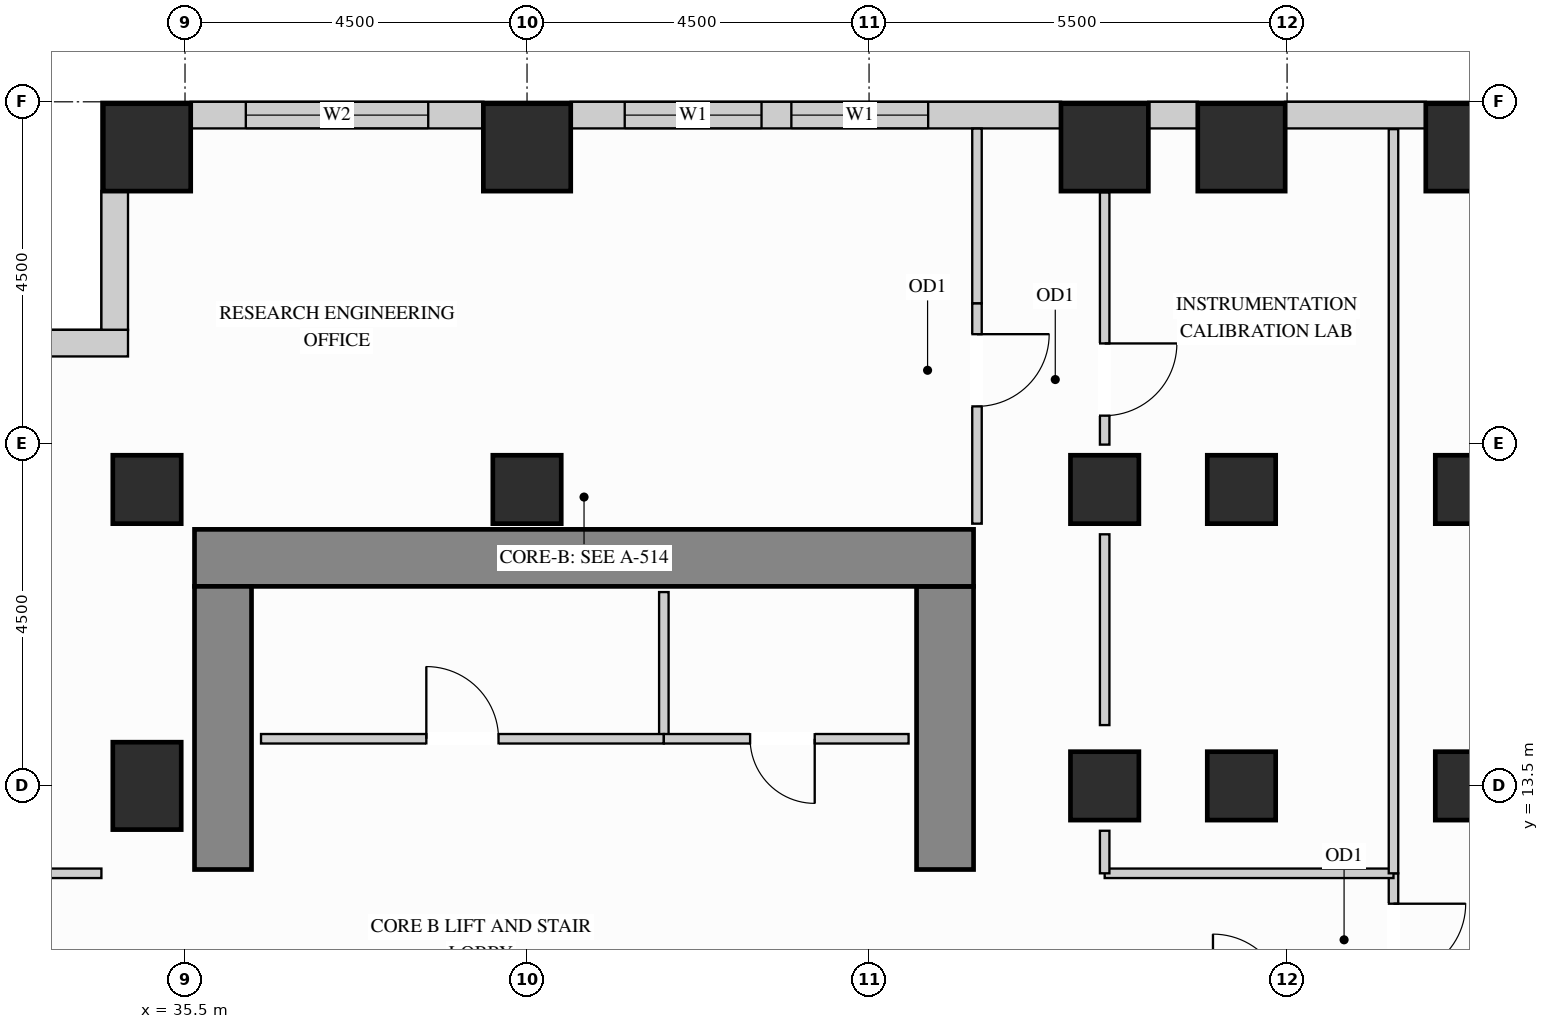
"""IFC4 building model, lengths in metres.
Left out: names, types, materials, properties, quantities, classifications, styles, units other than length and angle.
Written with IfcOpenShell. Run it as: python <this file> out.ifc"""

import sys

from ifc_helpers import new_model, si_unit, direction, frame, frame_2d, origin, origin_2d, place, context, subcontext, project, spatial, rectangle, extrude, source, transform, mapped, element, fill, save


model = new_model("IFC4")
c1 = context("Model", 3, precision=1e-05, world=origin(), true_north=direction((0.0, 1.0)))
c2 = subcontext(c1, "Body", "Model", "MODEL_VIEW")
j1 = project(units=[si_unit("LENGTHUNIT", "METRE"), si_unit("PLANEANGLEUNIT", "RADIAN")], contexts=[c1])
p1 = place(None, origin())
s1 = spatial("IfcSite", under=j1, at=p1, CompositionType="ELEMENT")
p2 = place(p1, origin())
s2 = spatial("IfcBuilding", under=s1, at=p2, CompositionType="ELEMENT")
p3 = place(p2, frame((0.0, 0.0, 120.6)))
s3 = spatial("IfcBuildingStorey", under=s2, at=p3, CompositionType="ELEMENT", Elevation=120.6)
m1 = source(origin(), c2, "Body", "SweptSolid", [
    extrude(rectangle(XDim=0.9, YDim=0.9, at=origin_2d()), origin(), (0.0, 0.0, 1.0), 3.38),
])
for number, where, z_axis, x_axis in (
    (1, (47.6, 13.5, 0.0), (0.0, 0.0, 1.0), (1.0, 0.0, 0.0)),
    (2, (35.0, 17.4, 0.0), (0.0, 0.0, 1.0), (1.0, 0.0, 0.0)),
    (3, (40.0, 17.4, 0.0), (0.0, 0.0, 1.0), (1.0, 0.0, 0.0)),
    (4, (47.6, 17.4, 0.0), (0.0, 0.0, 1.0), (1.0, 0.0, 0.0)),
    (5, (49.4, 13.5, 0.0), (0.0, 0.0, 1.0), (1.0, 0.0, 0.0)),
    (6, (49.4, 17.4, 0.0), (0.0, 0.0, 1.0), (1.0, 0.0, 0.0)),
    (7, (52.4, 13.5, 0.0), (0.0, 0.0, 1.0), (1.0, 0.0, 0.0)),
    (8, (52.4, 17.4, 0.0), (0.0, 0.0, 1.0), (1.0, 0.0, 0.0)),
):
    element("IfcColumn", number, at=place(p3, frame(where, z_axis=z_axis, x_axis=x_axis)), inside=s3, PredefinedType="COLUMN", context=c2, shape_type="MappedRepresentation", body=[
        mapped(m1, transform((0.0, 0.0, 0.0), x_axis=(1.0, 0.0, 0.0), y_axis=(0.0, 1.0, 0.0), z_axis=(0.0, 0.0, 1.0))),
    ])
m2 = source(origin(), c2, "Body", "SweptSolid", [
    extrude(rectangle(XDim=0.9, YDim=1.15, at=origin_2d()), origin(), (0.0, 0.0, 1.0), 3.38),
])
p4 = place(p3, frame((35.0, 13.5, 0.0), z_axis=(0.0, 0.0, 1.0), x_axis=(1.0, 0.0, 0.0)))
e9 = element("IfcColumn", 9, at=p4, inside=s3, PredefinedType="COLUMN", context=c2, shape_type="MappedRepresentation", body=[
    mapped(m2, transform((0.0, 0.0, 0.0), x_axis=(1.0, 0.0, 0.0), y_axis=(0.0, 1.0, 0.0), z_axis=(0.0, 0.0, 1.0))),
])
m3 = source(origin(), c2, "Body", "SweptSolid", [
    extrude(rectangle(XDim=1.15, YDim=1.15, at=origin_2d()), origin(), (0.0, 0.0, 1.0), 3.38),
])
for number, where, z_axis, x_axis in (
    (10, (35.0, 21.9, 0.0), (0.0, 0.0, 1.0), (1.0, 0.0, 0.0)),
    (11, (40.0, 21.9, 0.0), (0.0, 0.0, 1.0), (1.0, 0.0, 0.0)),
    (12, (47.6, 21.9, 0.0), (0.0, 0.0, 1.0), (1.0, 0.0, 0.0)),
    (13, (49.4, 21.9, 0.0), (0.0, 0.0, 1.0), (1.0, 0.0, 0.0)),
    (14, (52.4, 21.9, 0.0), (0.0, 0.0, 1.0), (1.0, 0.0, 0.0)),
):
    element("IfcColumn", number, at=place(p3, frame(where, z_axis=z_axis, x_axis=x_axis)), inside=s3, PredefinedType="COLUMN", context=c2, shape_type="MappedRepresentation", body=[
        mapped(m3, transform((0.0, 0.0, 0.0), x_axis=(1.0, 0.0, 0.0), y_axis=(0.0, 1.0, 0.0), z_axis=(0.0, 0.0, 1.0))),
    ])
m4 = source(origin(), c2, "Body", "SweptSolid", [
    extrude(rectangle(XDim=3.725, YDim=0.75, at=frame_2d((1.863, 0.0))), origin(), (0.0, 0.0, 1.0), 3.38),
])
p5 = place(p3, frame((45.5, 12.4, 0.0), z_axis=(0.0, 0.0, 1.0), x_axis=(0.0, 1.0, 0.0)))
e15 = element("IfcWall", 15, at=p5, inside=s3, PredefinedType="SHEAR", context=c2, shape_type="MappedRepresentation", body=[
    mapped(m4, transform((0.0, 0.0, 0.0), x_axis=(1.0, 0.0, 0.0), y_axis=(0.0, 1.0, 0.0), z_axis=(0.0, 0.0, 1.0))),
])
m5 = source(origin(), c2, "Body", "SweptSolid", [
    extrude(rectangle(XDim=10.25, YDim=0.75, at=frame_2d((5.125, 0.0))), origin(), (0.0, 0.0, 1.0), 3.38),
])
p6 = place(p3, frame((35.625, 16.5, 0.0), z_axis=(0.0, 0.0, 1.0), x_axis=(1.0, 0.0, 0.0)))
e16 = element("IfcWall", 16, at=p6, inside=s3, PredefinedType="SHEAR", context=c2, shape_type="MappedRepresentation", body=[
    mapped(m5, transform((0.0, 0.0, 0.0), x_axis=(1.0, 0.0, 0.0), y_axis=(0.0, 1.0, 0.0), z_axis=(0.0, 0.0, 1.0))),
])
p7 = place(p3, frame((36.0, 12.4, 0.0), z_axis=(0.0, 0.0, 1.0), x_axis=(0.0, 1.0, 0.0)))
e17 = element("IfcWall", 17, at=p7, inside=s3, PredefinedType="SHEAR", context=c2, shape_type="MappedRepresentation", body=[
    mapped(m4, transform((0.0, 0.0, 0.0), x_axis=(1.0, 0.0, 0.0), y_axis=(0.0, 1.0, 0.0), z_axis=(0.0, 0.0, 1.0))),
])
m6 = source(origin(), c2, "Body", "SweptSolid", [
    extrude(rectangle(XDim=1.854, YDim=0.35, at=frame_2d((0.927, 0.0))), origin(), (0.0, 0.0, 1.0), 3.365),
])
p8 = place(p3, frame((51.827, 22.325, 0.0), z_axis=(0.0, 0.0, 1.0), x_axis=(-1.0, 0.0, 0.0)))
e18 = element("IfcWall", 18, at=p8, inside=s3, PredefinedType="SOLIDWALL", context=c2, shape_type="MappedRepresentation", body=[
    mapped(m6, transform((0.0, 0.0, 0.0), x_axis=(1.0, 0.0, 0.0), y_axis=(0.0, 1.0, 0.0), z_axis=(0.0, 0.0, 1.0))),
])
m7 = source(origin(), c2, "Body", "SweptSolid", [
    extrude(rectangle(XDim=0.654, YDim=0.35, at=frame_2d((0.327, 0.0))), origin(), (0.0, 0.0, 1.0), 3.365),
])
p9 = place(p3, frame((48.827, 22.325, 0.0), z_axis=(0.0, 0.0, 1.0), x_axis=(-1.0, 0.0, 0.0)))
e19 = element("IfcWall", 19, at=p9, inside=s3, PredefinedType="SOLIDWALL", context=c2, shape_type="MappedRepresentation", body=[
    mapped(m7, transform((0.0, 0.0, 0.0), x_axis=(1.0, 0.0, 0.0), y_axis=(0.0, 1.0, 0.0), z_axis=(0.0, 0.0, 1.0))),
])
p10 = place(p3, frame((47.027, 22.325, 0.0), z_axis=(0.0, 0.0, 1.0), x_axis=(-1.0, 0.0, 0.0)))
e20 = element("IfcWall", 20, at=p10, inside=s3, PredefinedType="SOLIDWALL", context=c2, shape_type="SweptSolid", body=[
    extrude(rectangle(XDim=6.454, YDim=0.35, at=frame_2d((3.227, 0.0))), origin(), (0.0, 0.0, 1.0), 3.365),
])
p11 = place(p10, frame((1.749, 0.0, 0.78)))
e21 = element("IfcOpeningElement", 21, at=p11, cuts=e20, PredefinedType="OPENING", context=c2, shape_type="SweptSolid", body=[
    extrude(rectangle(XDim=1.8, YDim=2.1, at=frame_2d((0.9, 1.05))), frame((0.0, 0.185, 0.0), z_axis=(0.0, -1.0, 0.0), x_axis=(1.0, 0.0, 0.0)), (0.0, 0.0, 1.0), 0.37),
])
p12 = place(p10, frame((3.942, 0.0, 0.78)))
e22 = element("IfcOpeningElement", 22, at=p12, cuts=e20, PredefinedType="OPENING", context=c2, shape_type="SweptSolid", body=[
    extrude(rectangle(XDim=1.8, YDim=2.1, at=frame_2d((0.9, 1.05))), frame((0.0, 0.185, 0.0), z_axis=(0.0, -1.0, 0.0), x_axis=(1.0, 0.0, 0.0)), (0.0, 0.0, 1.0), 0.37),
])
p13 = place(p3, frame((39.427, 22.325, 0.0), z_axis=(0.0, 0.0, 1.0), x_axis=(-1.0, 0.0, 0.0)))
e23 = element("IfcWall", 23, at=p13, inside=s3, PredefinedType="SOLIDWALL", context=c2, shape_type="SweptSolid", body=[
    extrude(rectangle(XDim=3.854, YDim=0.35, at=frame_2d((1.927, 0.0))), origin(), (0.0, 0.0, 1.0), 3.365),
])
p14 = place(p13, frame((0.727, 0.0, 0.78)))
e24 = element("IfcOpeningElement", 24, at=p14, cuts=e23, PredefinedType="OPENING", context=c2, shape_type="SweptSolid", body=[
    extrude(rectangle(XDim=2.4, YDim=2.1, at=frame_2d((1.2, 1.05))), frame((0.0, 0.185, 0.0), z_axis=(0.0, -1.0, 0.0), x_axis=(1.0, 0.0, 0.0)), (0.0, 0.0, 1.0), 0.37),
])
m8 = source(origin(), c2, "Body", "SweptSolid", [
    extrude(rectangle(XDim=1.829, YDim=0.35, at=frame_2d((0.915, 0.0))), origin(), (0.0, 0.0, 1.0), 3.365),
])
p15 = place(p3, frame((34.575, 21.327, 0.0), z_axis=(0.0, 0.0, 1.0), x_axis=(0.0, -1.0, 0.0)))
e25 = element("IfcWall", 25, at=p15, inside=s3, PredefinedType="SOLIDWALL", context=c2, shape_type="MappedRepresentation", body=[
    mapped(m8, transform((0.0, 0.0, 0.0), x_axis=(1.0, 0.0, 0.0), y_axis=(0.0, 1.0, 0.0), z_axis=(0.0, 0.0, 1.0))),
])
p16 = place(p3, frame((34.75, 19.325, 0.0), z_axis=(0.0, 0.0, 1.0), x_axis=(-1.0, 0.0, 0.0)))
e26 = element("IfcWall", 26, at=p16, inside=s3, PredefinedType="SOLIDWALL", context=c2, shape_type="SweptSolid", body=[
    extrude(rectangle(XDim=15.6, YDim=0.35, at=frame_2d((7.8, 0.0))), origin(), (0.0, 0.0, 1.0), 3.365),
])
p17 = place(p16, frame((4.307, 0.0, 0.78)))
e27 = element("IfcOpeningElement", 27, at=p17, cuts=e26, PredefinedType="OPENING", context=c2, shape_type="SweptSolid", body=[
    extrude(rectangle(XDim=1.5, YDim=2.0, at=frame_2d((0.75, 1.0))), frame((0.0, 0.185, 0.0), z_axis=(0.0, -1.0, 0.0), x_axis=(1.0, 0.0, 0.0)), (0.0, 0.0, 1.0), 0.37),
])
p18 = place(p16, frame((9.793, 0.0, 0.78)))
e28 = element("IfcOpeningElement", 28, at=p18, cuts=e26, PredefinedType="OPENING", context=c2, shape_type="SweptSolid", body=[
    extrude(rectangle(XDim=1.5, YDim=2.0, at=frame_2d((0.75, 1.0))), frame((0.0, 0.185, 0.0), z_axis=(0.0, -1.0, 0.0), x_axis=(1.0, 0.0, 0.0)), (0.0, 0.0, 1.0), 0.37),
])
m9 = source(origin(), c2, "Body", "SweptSolid", [
    extrude(rectangle(XDim=1.93, YDim=0.125, at=frame_2d((0.965, 0.0))), origin(), (0.0, 0.0, 1.0), 3.365),
])
p19 = place(p3, frame((41.8, 14.12, 0.0), z_axis=(0.0, 0.0, 1.0), x_axis=(0.0, 1.0, 0.0)))
e29 = element("IfcWall", 29, at=p19, inside=s3, PredefinedType="PARTITIONING", context=c2, shape_type="MappedRepresentation", body=[
    mapped(m9, transform((0.0, 0.0, 0.0), x_axis=(1.0, 0.0, 0.0), y_axis=(0.0, 1.0, 0.0), z_axis=(0.0, 0.0, 1.0))),
])
p20 = place(p3, frame((36.5, 14.12, 0.0), z_axis=(0.0, 0.0, 1.0), x_axis=(1.0, 0.0, 0.0)))
e30 = element("IfcWall", 30, at=p20, inside=s3, PredefinedType="PARTITIONING", context=c2, shape_type="SweptSolid", body=[
    extrude(rectangle(XDim=5.3, YDim=0.125, at=frame_2d((2.65, 0.0))), origin(), (0.0, 0.0, 1.0), 3.365),
])
p21 = place(p20, frame((2.175, 0.0, 0.0)))
e31 = element("IfcOpeningElement", 31, at=p21, cuts=e30, PredefinedType="OPENING", context=c2, shape_type="SweptSolid", body=[
    extrude(rectangle(XDim=0.95, YDim=2.15, at=frame_2d((0.475, 1.075))), frame((0.0, 0.073, 0.0), z_axis=(0.0, -1.0, 0.0), x_axis=(1.0, 0.0, 0.0)), (0.0, 0.0, 1.0), 0.145),
])
p22 = place(p3, frame((41.8, 14.12, 0.0), z_axis=(0.0, 0.0, 1.0), x_axis=(1.0, 0.0, 0.0)))
e32 = element("IfcWall", 32, at=p22, inside=s3, PredefinedType="PARTITIONING", context=c2, shape_type="SweptSolid", body=[
    extrude(rectangle(XDim=3.22, YDim=0.125, at=frame_2d((1.61, 0.0))), origin(), (0.0, 0.0, 1.0), 3.365),
])
p23 = place(p22, frame((1.135, 0.0, 0.0)))
e33 = element("IfcOpeningElement", 33, at=p23, cuts=e32, PredefinedType="OPENING", context=c2, shape_type="SweptSolid", body=[
    extrude(rectangle(XDim=0.85, YDim=2.1, at=frame_2d((0.425, 1.05))), frame((0.0, 0.073, 0.0), z_axis=(0.0, -1.0, 0.0), x_axis=(1.0, 0.0, 0.0)), (0.0, 0.0, 1.0), 0.145),
])
p24 = place(p3, frame((51.4, 10.6, 0.0), z_axis=(0.0, 0.0, 1.0), x_axis=(0.0, 1.0, 0.0)))
e34 = element("IfcWall", 34, at=p24, inside=s3, PredefinedType="PARTITIONING", context=c2, shape_type="SweptSolid", body=[
    extrude(rectangle(XDim=1.75, YDim=0.125, at=frame_2d((0.875, 0.0))), origin(), (0.0, 0.0, 1.0), 3.365),
])
p25 = place(p24, frame((0.4, 0.0, 0.0)))
e35 = element("IfcOpeningElement", 35, at=p25, cuts=e34, PredefinedType="OPENING", context=c2, shape_type="SweptSolid", body=[
    extrude(rectangle(XDim=0.95, YDim=2.15, at=frame_2d((0.475, 1.075))), frame((0.0, 0.073, 0.0), z_axis=(0.0, -1.0, 0.0), x_axis=(1.0, 0.0, 0.0)), (0.0, 0.0, 1.0), 0.145),
])
m10 = source(origin(), c2, "Body", "SweptSolid", [
    extrude(rectangle(XDim=3.8, YDim=0.125, at=frame_2d((1.9, 0.0))), origin(), (0.0, 0.0, 1.0), 3.365),
])
p26 = place(p3, frame((47.6, 12.35, 0.0), z_axis=(0.0, 0.0, 1.0), x_axis=(1.0, 0.0, 0.0)))
e36 = element("IfcWall", 36, at=p26, inside=s3, PredefinedType="PARTITIONING", context=c2, shape_type="MappedRepresentation", body=[
    mapped(m10, transform((0.0, 0.0, 0.0), x_axis=(1.0, 0.0, 0.0), y_axis=(0.0, 1.0, 0.0), z_axis=(0.0, 0.0, 1.0))),
])
m11 = source(origin(), c2, "Body", "SweptSolid", [
    extrude(rectangle(XDim=9.79, YDim=0.125, at=frame_2d((4.895, 0.0))), origin(), (0.0, 0.0, 1.0), 3.365),
])
p27 = place(p3, frame((51.4, 12.35, 0.0), z_axis=(0.0, 0.0, 1.0), x_axis=(0.0, 1.0, 0.0)))
e37 = element("IfcWall", 37, at=p27, inside=s3, PredefinedType="PARTITIONING", context=c2, shape_type="MappedRepresentation", body=[
    mapped(m11, transform((0.0, 0.0, 0.0), x_axis=(1.0, 0.0, 0.0), y_axis=(0.0, 1.0, 0.0), z_axis=(0.0, 0.0, 1.0))),
])
m12 = source(origin(), c2, "Body", "SweptSolid", [
    extrude(rectangle(XDim=2.51, YDim=0.125, at=frame_2d((1.255, 0.0))), origin(), (0.0, 0.0, 1.0), 2.677),
])
p28 = place(p3, frame((47.6, 14.3, 0.0), z_axis=(0.0, 0.0, 1.0), x_axis=(0.0, 1.0, 0.0)))
e38 = element("IfcWall", 38, at=p28, inside=s3, PredefinedType="PARTITIONING", context=c2, shape_type="MappedRepresentation", body=[
    mapped(m12, transform((0.0, 0.0, 0.0), x_axis=(1.0, 0.0, 0.0), y_axis=(0.0, 1.0, 0.0), z_axis=(0.0, 0.0, 1.0))),
])
p29 = place(p3, frame((47.6, 17.99, 0.0), z_axis=(0.0, 0.0, 1.0), x_axis=(0.0, 1.0, 0.0)))
e39 = element("IfcWall", 39, at=p29, inside=s3, PredefinedType="PARTITIONING", context=c2, shape_type="SweptSolid", body=[
    extrude(rectangle(XDim=3.32, YDim=0.125, at=frame_2d((1.66, 0.0))), origin(), (0.0, 0.0, 1.0), 2.677),
])
p30 = place(p29, frame((0.381, 0.0, 0.0)))
e40 = element("IfcOpeningElement", 40, at=p30, cuts=e39, PredefinedType="OPENING", context=c2, shape_type="SweptSolid", body=[
    extrude(rectangle(XDim=0.95, YDim=2.15, at=frame_2d((0.475, 1.075))), frame((0.0, 0.073, 0.0), z_axis=(0.0, -1.0, 0.0), x_axis=(1.0, 0.0, 0.0)), (0.0, 0.0, 1.0), 0.145),
])
m13 = source(origin(), c2, "Body", "SweptSolid", [
    extrude(rectangle(XDim=0.56, YDim=0.125, at=frame_2d((0.28, 0.0))), origin(), (0.0, 0.0, 1.0), 2.677),
])
p31 = place(p3, frame((47.6, 12.35, 0.0), z_axis=(0.0, 0.0, 1.0), x_axis=(0.0, 1.0, 0.0)))
e41 = element("IfcWall", 41, at=p31, inside=s3, PredefinedType="PARTITIONING", context=c2, shape_type="MappedRepresentation", body=[
    mapped(m13, transform((0.0, 0.0, 0.0), x_axis=(1.0, 0.0, 0.0), y_axis=(0.0, 1.0, 0.0), z_axis=(0.0, 0.0, 1.0))),
])
p32 = place(p3, frame((45.92, 16.95, 0.0), z_axis=(0.0, 0.0, 1.0), x_axis=(0.0, 1.0, 0.0)))
e42 = element("IfcWall", 42, at=p32, inside=s3, PredefinedType="PARTITIONING", context=c2, shape_type="SweptSolid", body=[
    extrude(rectangle(XDim=2.9, YDim=0.125, at=frame_2d((1.45, 0.0))), origin(), (0.0, 0.0, 1.0), 3.365),
])
p33 = place(p32, frame((1.543, 0.0, 0.0)))
e43 = element("IfcOpeningElement", 43, at=p33, cuts=e42, PredefinedType="OPENING", context=c2, shape_type="SweptSolid", body=[
    extrude(rectangle(XDim=0.95, YDim=2.15, at=frame_2d((0.475, 1.075))), frame((0.0, 0.073, 0.0), z_axis=(0.0, -1.0, 0.0), x_axis=(1.0, 0.0, 0.0)), (0.0, 0.0, 1.0), 0.145),
])
m14 = source(origin(), c2, "Body", "SweptSolid", [
    extrude(rectangle(XDim=2.298, YDim=0.125, at=frame_2d((1.149, 0.0))), origin(), (0.0, 0.0, 1.0), 3.365),
])
p34 = place(p3, frame((45.92, 19.85, 0.0), z_axis=(0.0, 0.0, 1.0), x_axis=(0.0, 1.0, 0.0)))
e44 = element("IfcWall", 44, at=p34, inside=s3, PredefinedType="PARTITIONING", context=c2, shape_type="MappedRepresentation", body=[
    mapped(m14, transform((0.0, 0.0, 0.0), x_axis=(1.0, 0.0, 0.0), y_axis=(0.0, 1.0, 0.0), z_axis=(0.0, 0.0, 1.0))),
])
p35 = place(p3, frame((29.85, 12.35, 0.0), z_axis=(0.0, 0.0, 1.0), x_axis=(1.0, 0.0, 0.0)))
e45 = element("IfcWall", 45, at=p35, inside=s3, PredefinedType="PARTITIONING", context=c2, shape_type="SweptSolid", body=[
    extrude(rectangle(XDim=4.55, YDim=0.125, at=frame_2d((2.275, 0.0))), origin(), (0.0, 0.0, 1.0), 3.365),
])
p36 = place(p35, frame((1.8, 0.0, 0.0)))
e46 = element("IfcOpeningElement", 46, at=p36, cuts=e45, PredefinedType="OPENING", context=c2, shape_type="SweptSolid", body=[
    extrude(rectangle(XDim=0.95, YDim=2.15, at=frame_2d((0.475, 1.075))), frame((0.0, 0.073, 0.0), z_axis=(0.0, -1.0, 0.0), x_axis=(1.0, 0.0, 0.0)), (0.0, 0.0, 1.0), 0.145),
])
m15 = source(origin(), c2, "Body", "SweptSolid", [
    extrude(rectangle(XDim=0.95, YDim=2.15, at=frame_2d((0.475, 1.075))), frame((0.0, 0.025, 0.0), z_axis=(0.0, -1.0, 0.0), x_axis=(1.0, 0.0, 0.0)), (0.0, 0.0, 1.0), 0.05),
])
p37 = place(p21, origin())
e47 = element("IfcDoor", 47, at=p37, inside=s3, OperationType="SINGLE_SWING_LEFT", PredefinedType="DOOR", context=c2, shape_type="MappedRepresentation", body=[
    mapped(m15, transform((0.0, 0.0, 0.0), x_axis=(1.0, 0.0, 0.0), y_axis=(0.0, 1.0, 0.0), z_axis=(0.0, 0.0, 1.0))),
])
fill(e31, e47)
p38 = place(p33, origin())
e48 = element("IfcDoor", 48, at=p38, inside=s3, OperationType="SINGLE_SWING_RIGHT", PredefinedType="DOOR", context=c2, shape_type="MappedRepresentation", body=[
    mapped(m15, transform((0.0, 0.0, 0.0), x_axis=(1.0, 0.0, 0.0), y_axis=(0.0, 1.0, 0.0), z_axis=(0.0, 0.0, 1.0))),
])
fill(e43, e48)
p39 = place(p25, origin())
e49 = element("IfcDoor", 49, at=p39, inside=s3, OperationType="SINGLE_SWING_RIGHT", PredefinedType="DOOR", context=c2, shape_type="MappedRepresentation", body=[
    mapped(m15, transform((0.0, 0.0, 0.0), x_axis=(1.0, 0.0, 0.0), y_axis=(0.0, 1.0, 0.0), z_axis=(0.0, 0.0, 1.0))),
])
fill(e35, e49)
p40 = place(p30, origin())
e50 = element("IfcDoor", 50, at=p40, inside=s3, OperationType="SINGLE_SWING_RIGHT", PredefinedType="DOOR", context=c2, shape_type="MappedRepresentation", body=[
    mapped(m15, transform((0.0, 0.0, 0.0), x_axis=(1.0, 0.0, 0.0), y_axis=(0.0, 1.0, 0.0), z_axis=(0.0, 0.0, 1.0))),
])
fill(e40, e50)
m16 = source(origin(), c2, "Body", "SweptSolid", [
    extrude(rectangle(XDim=0.85, YDim=2.1, at=frame_2d((0.425, 1.05))), frame((0.0, 0.025, 0.0), z_axis=(0.0, -1.0, 0.0), x_axis=(1.0, 0.0, 0.0)), (0.0, 0.0, 1.0), 0.05),
])
p41 = place(p23, origin())
e51 = element("IfcDoor", 51, at=p41, inside=s3, OperationType="SINGLE_SWING_RIGHT", PredefinedType="DOOR", context=c2, shape_type="MappedRepresentation", body=[
    mapped(m16, transform((0.0, 0.0, 0.0), x_axis=(1.0, 0.0, 0.0), y_axis=(0.0, 1.0, 0.0), z_axis=(0.0, 0.0, 1.0))),
])
fill(e33, e51)
m17 = source(origin(), c2, "Body", "SweptSolid", [
    extrude(rectangle(XDim=1.8, YDim=2.1, at=frame_2d((0.9, 1.05))), frame((0.0, 0.03, 0.0), z_axis=(0.0, -1.0, 0.0), x_axis=(1.0, 0.0, 0.0)), (0.0, 0.0, 1.0), 0.06),
])
p42 = place(p11, origin())
e52 = element("IfcWindow", 52, at=p42, inside=s3, PartitioningType="SINGLE_PANEL", PredefinedType="WINDOW", context=c2, shape_type="MappedRepresentation", body=[
    mapped(m17, transform((0.0, 0.0, 0.0), x_axis=(1.0, 0.0, 0.0), y_axis=(0.0, 1.0, 0.0), z_axis=(0.0, 0.0, 1.0))),
])
fill(e21, e52)
p43 = place(p12, origin())
e53 = element("IfcWindow", 53, at=p43, inside=s3, PartitioningType="SINGLE_PANEL", PredefinedType="WINDOW", context=c2, shape_type="MappedRepresentation", body=[
    mapped(m17, transform((0.0, 0.0, 0.0), x_axis=(1.0, 0.0, 0.0), y_axis=(0.0, 1.0, 0.0), z_axis=(0.0, 0.0, 1.0))),
])
fill(e22, e53)
m18 = source(origin(), c2, "Body", "SweptSolid", [
    extrude(rectangle(XDim=2.4, YDim=2.1, at=frame_2d((1.2, 1.05))), frame((0.0, 0.03, 0.0), z_axis=(0.0, -1.0, 0.0), x_axis=(1.0, 0.0, 0.0)), (0.0, 0.0, 1.0), 0.06),
])
p44 = place(p14, origin())
e54 = element("IfcWindow", 54, at=p44, inside=s3, PartitioningType="SINGLE_PANEL", PredefinedType="WINDOW", context=c2, shape_type="MappedRepresentation", body=[
    mapped(m18, transform((0.0, 0.0, 0.0), x_axis=(1.0, 0.0, 0.0), y_axis=(0.0, 1.0, 0.0), z_axis=(0.0, 0.0, 1.0))),
])
fill(e24, e54)
save(model, sys.argv[1])
